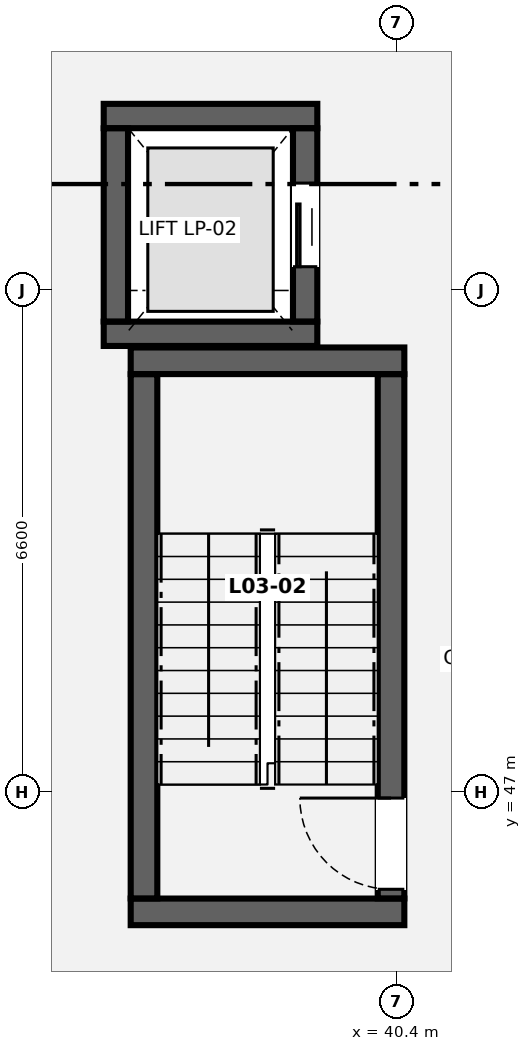
"""IFC4 building model, lengths in metres.
Left out: names, types, materials, properties, quantities, classifications, styles, units other than length and angle.
Written with IfcOpenShell. Run it as: python <this file> out.ifc"""

import sys

from ifc_helpers import new_model, si_unit, direction, frame, frame_2d, origin, place, context, subcontext, project, spatial, rectangle, extrude, element, fill, save


model = new_model("IFC4")
c1 = context("Model", 3, precision=1e-05, world=origin(), true_north=direction((0.0, 1.0)))
c2 = subcontext(c1, "Body", "Model", "MODEL_VIEW")
j1 = project(units=[si_unit("LENGTHUNIT", "METRE"), si_unit("PLANEANGLEUNIT", "RADIAN")], contexts=[c1])
p1 = place(None, origin())
s1 = spatial("IfcSite", under=j1, at=p1, CompositionType="ELEMENT")
p2 = place(p1, origin())
s2 = spatial("IfcBuilding", under=s1, at=p2, CompositionType="ELEMENT")
p3 = place(p2, frame((0.0, 0.0, 13.3)))
s3 = spatial("IfcBuildingStorey", under=s2, at=p3, CompositionType="ELEMENT", Elevation=13.3)
for number, where, z_axis, x_axis in (
    (1, (36.9, 45.425, 0.0), (0.0, 0.0, 1.0), (1.0, 0.0, 0.0)),
    (2, (36.9, 52.675, 0.0), (0.0, 0.0, 1.0), (1.0, 0.0, 0.0)),
):
    element("IfcWall", number, at=place(p3, frame(where, z_axis=z_axis, x_axis=x_axis)), inside=s3, PredefinedType="SHEAR", context=c2, shape_type="SweptSolid", body=[
        extrude(rectangle(XDim=3.6, YDim=0.35, at=frame_2d((1.8, 0.0))), origin(), (0.0, 0.0, 1.0), 3.98),
    ])
p4 = place(p3, frame((37.075, 45.602, 0.0), z_axis=(0.0, 0.0, 1.0), x_axis=(0.0, 1.0, 0.0)))
e3 = element("IfcWall", 3, at=p4, inside=s3, PredefinedType="SHEAR", context=c2, shape_type="SweptSolid", body=[
    extrude(rectangle(XDim=6.896, YDim=0.35, at=frame_2d((3.448, 0.0))), origin(), (0.0, 0.0, 1.0), 3.98),
])
p5 = place(p3, frame((40.325, 45.602, 0.0), z_axis=(0.0, 0.0, 1.0), x_axis=(0.0, 1.0, 0.0)))
e4 = element("IfcWall", 4, at=p5, inside=s3, PredefinedType="SHEAR", context=c2, shape_type="SweptSolid", body=[
    extrude(rectangle(XDim=6.896, YDim=0.35, at=frame_2d((3.448, 0.0))), origin(), (0.0, 0.0, 1.0), 3.98),
])
p6 = place(p5, frame((0.12, 0.0, 0.0)))
e5 = element("IfcOpeningElement", 5, at=p6, cuts=e4, PredefinedType="OPENING", context=c2, shape_type="SweptSolid", body=[
    extrude(rectangle(XDim=1.2, YDim=2.15, at=frame_2d((0.6, 1.075))), frame((0.0, 0.185, 0.0), z_axis=(0.0, -1.0, 0.0), x_axis=(1.0, 0.0, 0.0)), (0.0, 0.0, 1.0), 0.37),
])
for number, where, z_axis, x_axis in (
    (6, (36.545, 53.03, 0.0), (0.0, 0.0, 1.0), (1.0, 0.0, 0.0)),
    (7, (36.545, 55.895, 0.0), (0.0, 0.0, 1.0), (1.0, 0.0, 0.0)),
):
    element("IfcWall", number, at=place(p3, frame(where, z_axis=z_axis, x_axis=x_axis)), inside=s3, PredefinedType="SHEAR", context=c2, shape_type="SweptSolid", body=[
        extrude(rectangle(XDim=2.81, YDim=0.32, at=frame_2d((1.405, 0.0))), origin(), (0.0, 0.0, 1.0), 3.98),
    ])
p7 = place(p3, frame((36.705, 53.192, 0.0), z_axis=(0.0, 0.0, 1.0), x_axis=(0.0, 1.0, 0.0)))
e8 = element("IfcWall", 8, at=p7, inside=s3, PredefinedType="SHEAR", context=c2, shape_type="SweptSolid", body=[
    extrude(rectangle(XDim=2.541, YDim=0.32, at=frame_2d((1.271, 0.0))), origin(), (0.0, 0.0, 1.0), 3.98),
])
p8 = place(p3, frame((39.195, 53.192, 0.0), z_axis=(0.0, 0.0, 1.0), x_axis=(0.0, 1.0, 0.0)))
e9 = element("IfcWall", 9, at=p8, inside=s3, PredefinedType="SHEAR", context=c2, shape_type="SweptSolid", body=[
    extrude(rectangle(XDim=2.541, YDim=0.32, at=frame_2d((1.271, 0.0))), origin(), (0.0, 0.0, 1.0), 3.98),
])
p9 = place(p8, frame((0.72, 0.0, 0.0)))
e10 = element("IfcOpeningElement", 10, at=p9, cuts=e9, PredefinedType="OPENING", context=c2, shape_type="SweptSolid", body=[
    extrude(rectangle(XDim=1.1, YDim=2.15, at=frame_2d((0.55, 1.075))), frame((0.0, 0.17, 0.0), z_axis=(0.0, -1.0, 0.0), x_axis=(1.0, 0.0, 0.0)), (0.0, 0.0, 1.0), 0.34),
])
p10 = place(p6, origin())
e11 = element("IfcDoor", 11, at=p10, inside=s3, OperationType="SINGLE_SWING_RIGHT", PredefinedType="DOOR", context=c2, shape_type="SweptSolid", body=[
    extrude(rectangle(XDim=1.2, YDim=2.15, at=frame_2d((0.6, 1.075))), frame((0.0, 0.025, 0.0), z_axis=(0.0, -1.0, 0.0), x_axis=(1.0, 0.0, 0.0)), (0.0, 0.0, 1.0), 0.05),
])
fill(e5, e11)
p11 = place(p9, origin())
e12 = element("IfcDoor", 12, at=p11, inside=s3, OperationType="SLIDING_TO_LEFT", PredefinedType="DOOR", context=c2, shape_type="SweptSolid", body=[
    extrude(rectangle(XDim=1.1, YDim=2.15, at=frame_2d((0.55, 1.075))), frame((0.0, 0.025, 0.0), z_axis=(0.0, -1.0, 0.0), x_axis=(1.0, 0.0, 0.0)), (0.0, 0.0, 1.0), 0.05),
])
fill(e10, e12)
save(model, sys.argv[1])
